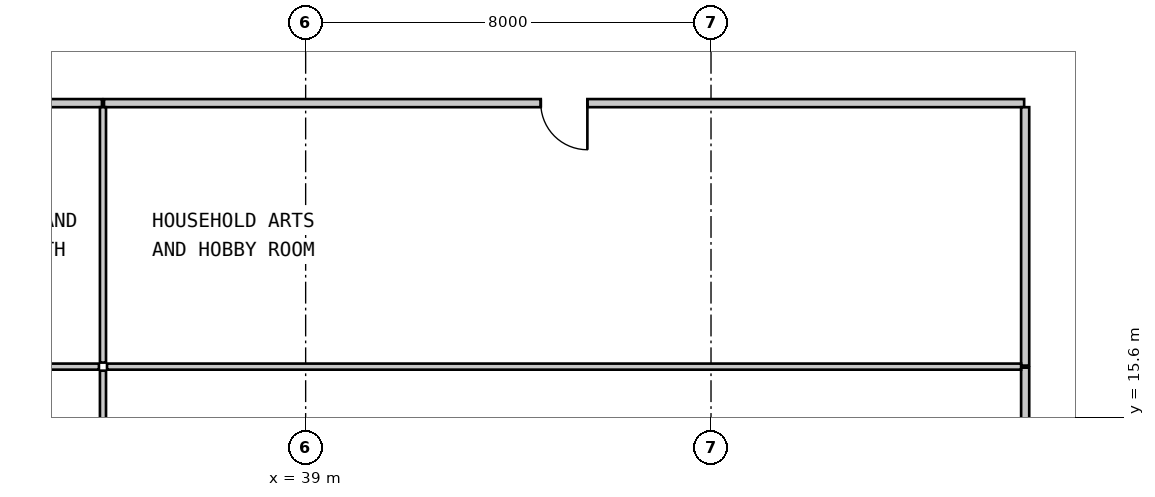
"""IFC4 building model, lengths in metres.
Left out: names, types, materials, properties, quantities, classifications, styles, units other than length and angle.
Written with IfcOpenShell. Run it as: python <this file> out.ifc"""

import sys

from ifc_helpers import new_model, si_unit, direction, frame, frame_2d, origin, place, context, subcontext, project, spatial, rectangle, extrude, source, transform, mapped, element, fill, save


model = new_model("IFC4")
c1 = context("Model", 3, precision=1e-05, world=origin(), true_north=direction((0.0, 1.0)))
c2 = subcontext(c1, "Body", "Model", "MODEL_VIEW")
j1 = project(units=[si_unit("LENGTHUNIT", "METRE"), si_unit("PLANEANGLEUNIT", "RADIAN")], contexts=[c1])
p1 = place(None, origin())
s1 = spatial("IfcSite", under=j1, at=p1, CompositionType="ELEMENT")
p2 = place(p1, origin())
s2 = spatial("IfcBuilding", under=s1, at=p2, CompositionType="ELEMENT")
p3 = place(p2, frame((0.0, 0.0, 19.95)))
s3 = spatial("IfcBuildingStorey", under=s2, at=p3, CompositionType="ELEMENT", Elevation=19.95)
m1 = source(origin(), c2, "Body", "SweptSolid", [
    extrude(rectangle(XDim=18.159, YDim=0.16, at=frame_2d((9.08, 0.0))), origin(), (0.0, 0.0, 1.0), 2.93),
])
p4 = place(p3, frame((34.98, 21.8, 0.0), z_axis=(0.0, 0.0, 1.0), x_axis=(-1.0, 0.0, 0.0)))
e1 = element("IfcWall", 1, at=p4, inside=s3, PredefinedType="PARTITIONING", context=c2, shape_type="MappedRepresentation", body=[
    mapped(m1, transform((0.0, 0.0, 0.0), scale=1.0)),
])
m2 = source(origin(), c2, "Body", "SweptSolid", [
    extrude(rectangle(XDim=0.92, YDim=2.1, at=frame_2d((0.46, 1.05))), frame((0.0, 0.09, 0.0), z_axis=(0.0, -1.0, 0.0), x_axis=(1.0, 0.0, 0.0)), (0.0, 0.0, 1.0), 0.18),
])
p5 = place(p4, frame((8.62, 0.0, 0.0)))
e2 = element("IfcOpeningElement", 2, at=p5, cuts=e1, PredefinedType="OPENING", context=c2, shape_type="MappedRepresentation", body=[
    mapped(m2, transform((0.0, 0.0, 0.0), scale=1.0)),
])
m3 = source(origin(), c2, "Body", "SweptSolid", [
    extrude(rectangle(XDim=5.16, YDim=0.16, at=frame_2d((2.58, 0.0))), origin(), (0.0, 0.0, 1.0), 2.93),
])
p6 = place(p3, frame((53.2, 11.42, 0.0), z_axis=(0.0, 0.0, 1.0), x_axis=(0.0, 1.0, 0.0)))
e3 = element("IfcWall", 3, at=p6, inside=s3, PredefinedType="PARTITIONING", context=c2, shape_type="MappedRepresentation", body=[
    mapped(m3, transform((0.0, 0.0, 0.0), scale=1.0)),
])
p7 = place(p3, frame((53.18, 21.8, 0.0), z_axis=(0.0, 0.0, 1.0), x_axis=(-1.0, 0.0, 0.0)))
e4 = element("IfcWall", 4, at=p7, inside=s3, PredefinedType="PARTITIONING", context=c2, shape_type="MappedRepresentation", body=[
    mapped(m1, transform((0.0, 0.0, 0.0), scale=1.0)),
])
p8 = place(p7, frame((8.62, 0.0, 0.0)))
e5 = element("IfcOpeningElement", 5, at=p8, cuts=e4, PredefinedType="OPENING", context=c2, shape_type="MappedRepresentation", body=[
    mapped(m2, transform((0.0, 0.0, 0.0), scale=1.0)),
])
m4 = source(origin(), c2, "Body", "SweptSolid", [
    extrude(rectangle(XDim=5.1, YDim=0.16, at=frame_2d((2.55, 0.0))), origin(), (0.0, 0.0, 1.0), 2.93),
])
p9 = place(p3, frame((53.2, 16.62, 0.0), z_axis=(0.0, 0.0, 1.0), x_axis=(0.0, 1.0, 0.0)))
e6 = element("IfcWall", 6, at=p9, inside=s3, PredefinedType="PARTITIONING", context=c2, shape_type="MappedRepresentation", body=[
    mapped(m4, transform((0.0, 0.0, 0.0), scale=1.0)),
])
m5 = source(origin(), c2, "Body", "SweptSolid", [
    extrude(rectangle(XDim=18.04, YDim=0.12, at=frame_2d((9.02, 0.0))), origin(), (0.0, 0.0, 1.0), 2.93),
])
p10 = place(p3, frame((16.88, 16.6, 0.0), z_axis=(0.0, 0.0, 1.0), x_axis=(1.0, 0.0, 0.0)))
e7 = element("IfcWall", 7, at=p10, inside=s3, PredefinedType="PARTITIONING", context=c2, shape_type="MappedRepresentation", body=[
    mapped(m5, transform((0.0, 0.0, 0.0), scale=1.0)),
])
m6 = source(origin(), c2, "Body", "SweptSolid", [
    extrude(rectangle(XDim=5.04, YDim=0.12, at=frame_2d((2.52, 0.0))), origin(), (0.0, 0.0, 1.0), 2.93),
])
for number, where, z_axis, x_axis in (
    (8, (35.0, 16.52, 0.0), (0.0, 0.0, 1.0), (0.0, -1.0, 0.0)),
    (9, (35.0, 21.72, 0.0), (0.0, 0.0, 1.0), (0.0, -1.0, 0.0)),
):
    element("IfcWall", number, at=place(p3, frame(where, z_axis=z_axis, x_axis=x_axis)), inside=s3, PredefinedType="PARTITIONING", context=c2, shape_type="MappedRepresentation", body=[
        mapped(m6, transform((0.0, 0.0, 0.0), scale=1.0)),
    ])
p11 = place(p3, frame((35.08, 16.6, 0.0), z_axis=(0.0, 0.0, 1.0), x_axis=(1.0, 0.0, 0.0)))
e10 = element("IfcWall", 10, at=p11, inside=s3, PredefinedType="PARTITIONING", context=c2, shape_type="MappedRepresentation", body=[
    mapped(m5, transform((0.0, 0.0, 0.0), scale=1.0)),
])
m7 = source(origin(), c2, "Body", "SweptSolid", [
    extrude(rectangle(XDim=0.92, YDim=2.1, at=frame_2d((0.46, 1.05))), frame((0.0, 0.025, 0.0), z_axis=(0.0, -1.0, 0.0), x_axis=(1.0, 0.0, 0.0)), (0.0, 0.0, 1.0), 0.05),
])
p12 = place(p8, origin())
e11 = element("IfcDoor", 11, at=p12, inside=s3, OperationType="SINGLE_SWING_LEFT", PredefinedType="DOOR", context=c2, shape_type="MappedRepresentation", body=[
    mapped(m7, transform((0.0, 0.0, 0.0), scale=1.0)),
])
fill(e5, e11)
save(model, sys.argv[1])
